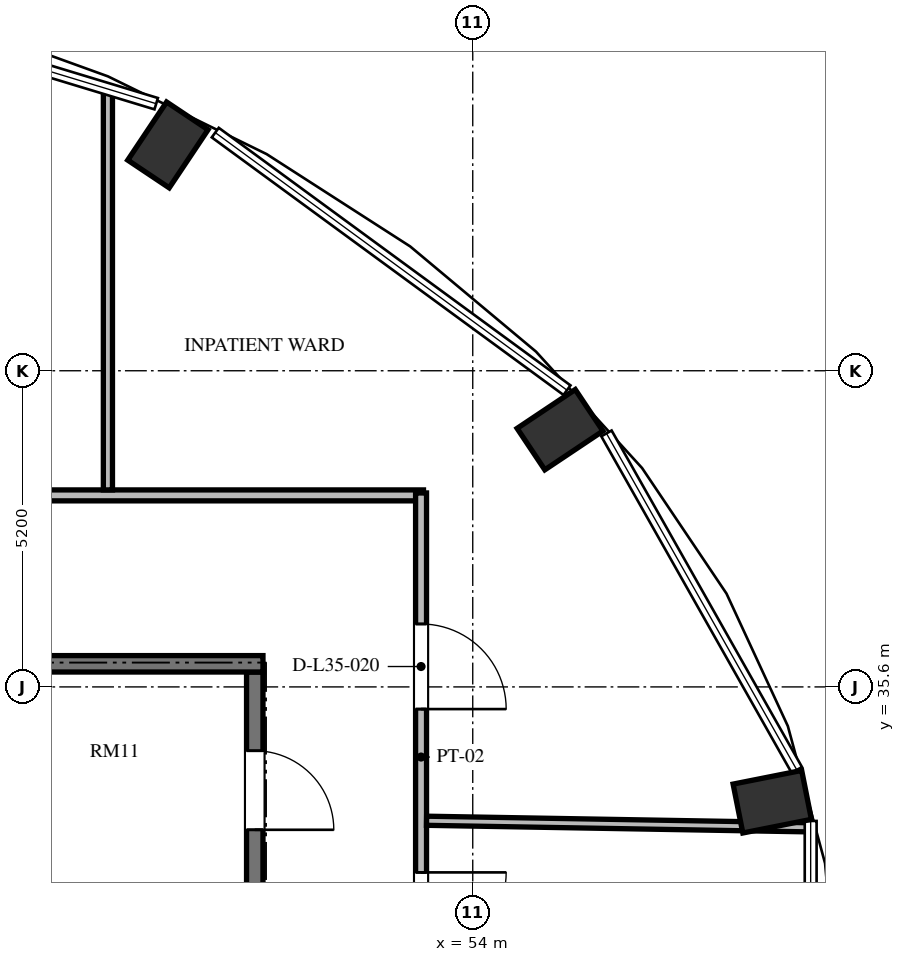
"""IFC4 building model, lengths in metres.
Left out: names, types, materials, properties, quantities, classifications, styles, units other than length and angle.
Written with IfcOpenShell. Run it as: python <this file> out.ifc"""

import sys

from ifc_helpers import new_model, si_unit, direction, frame, frame_2d, origin, origin_2d, place, context, subcontext, project, spatial, rectangle, extrude, element, fill, save


model = new_model("IFC4")
c1 = context("Model", 3, precision=1e-05, world=origin(), true_north=direction((0.0, 1.0)))
c2 = subcontext(c1, "Body", "Model", "MODEL_VIEW")
j1 = project(units=[si_unit("LENGTHUNIT", "METRE"), si_unit("PLANEANGLEUNIT", "RADIAN")], contexts=[c1])
p1 = place(None, origin())
s1 = spatial("IfcSite", under=j1, at=p1, CompositionType="ELEMENT")
p2 = place(p1, origin())
s2 = spatial("IfcBuilding", under=s1, at=p2, CompositionType="ELEMENT")
p3 = place(p2, frame((0.0, 0.0, 138.288)))
s3 = spatial("IfcBuildingStorey", under=s2, at=p3, CompositionType="ELEMENT", Elevation=138.288)
for number, where, z_axis, x_axis in (
    (1, (58.926, 33.712, 0.0), (0.0, 0.0, 1.0), (0.981, 0.195, 0.0)),
    (2, (55.436, 39.831, 0.0), (0.0, 0.0, 1.0), (0.831, 0.556, 0.0)),
    (3, (48.987, 44.514, 0.0), (0.0, 0.0, 1.0), (0.556, 0.831, 0.0)),
):
    element("IfcColumn", number, at=place(p3, frame(where, z_axis=z_axis, x_axis=x_axis)), inside=s3, PredefinedType="COLUMN", context=c2, shape_type="SweptSolid", body=[
        extrude(rectangle(XDim=1.15, YDim=0.82, at=origin_2d()), origin(), (0.0, 0.0, 1.0), 3.648),
    ])
p4 = place(p3, frame((50.415, 35.845, 0.0), z_axis=(0.0, 0.0, 1.0), x_axis=(0.0, -1.0, 0.0)))
e4 = element("IfcWall", 4, at=p4, inside=s3, PredefinedType="SHEAR", context=c2, shape_type="SweptSolid", body=[
    extrude(rectangle(XDim=15.825, YDim=0.27, at=frame_2d((7.913, 0.0))), origin(), (0.0, 0.0, 1.0), 3.648),
])
p5 = place(p4, frame((4.445, 0.0, 0.0)))
e5 = element("IfcOpeningElement", 5, at=p5, cuts=e4, PredefinedType="OPENING", context=c2, shape_type="SweptSolid", body=[
    extrude(rectangle(XDim=1.2, YDim=2.15, at=frame_2d((0.6, 1.075))), frame((0.0, 0.145, 0.0), z_axis=(0.0, -1.0, 0.0), x_axis=(1.0, 0.0, 0.0)), (0.0, 0.0, 1.0), 0.29),
])
p6 = place(p4, frame((1.295, 0.0, 0.0)))
e6 = element("IfcOpeningElement", 6, at=p6, cuts=e4, PredefinedType="OPENING", context=c2, shape_type="SweptSolid", body=[
    extrude(rectangle(XDim=1.3, YDim=2.2, at=frame_2d((0.65, 1.1))), frame((0.0, 0.145, 0.0), z_axis=(0.0, -1.0, 0.0), x_axis=(1.0, 0.0, 0.0)), (0.0, 0.0, 1.0), 0.29),
])
p7 = place(p4, frame((13.095, 0.0, 0.0)))
e7 = element("IfcOpeningElement", 7, at=p7, cuts=e4, PredefinedType="OPENING", context=c2, shape_type="SweptSolid", body=[
    extrude(rectangle(XDim=1.3, YDim=2.2, at=frame_2d((0.65, 1.1))), frame((0.0, 0.145, 0.0), z_axis=(0.0, -1.0, 0.0), x_axis=(1.0, 0.0, 0.0)), (0.0, 0.0, 1.0), 0.29),
])
p8 = place(p3, frame((46.0, 35.98, 0.0), z_axis=(0.0, 0.0, 1.0), x_axis=(1.0, 0.0, 0.0)))
e8 = element("IfcWall", 8, at=p8, inside=s3, PredefinedType="SHEAR", context=c2, shape_type="SweptSolid", body=[
    extrude(rectangle(XDim=4.55, YDim=0.27, at=frame_2d((2.275, 0.0))), origin(), (0.0, 0.0, 1.0), 3.648),
])
p9 = place(p3, frame((39.46, 38.75, 0.0), z_axis=(0.0, 0.0, 1.0), x_axis=(1.0, 0.0, 0.0)))
e9 = element("IfcWall", 9, at=p9, inside=s3, PredefinedType="PARTITIONING", context=c2, shape_type="SweptSolid", body=[
    extrude(rectangle(XDim=13.73, YDim=0.18, at=frame_2d((6.865, 0.0))), origin(), (0.0, 0.0, 1.0), 3.428),
])
p10 = place(p9, frame((5.59, 0.0, 0.0)))
e10 = element("IfcOpeningElement", 10, at=p10, cuts=e9, PredefinedType="OPENING", context=c2, shape_type="SweptSolid", body=[
    extrude(rectangle(XDim=1.4, YDim=2.2, at=frame_2d((0.7, 1.1))), frame((0.0, 0.1, 0.0), z_axis=(0.0, -1.0, 0.0), x_axis=(1.0, 0.0, 0.0)), (0.0, 0.0, 1.0), 0.2),
])
p11 = place(p3, frame((53.15, 38.79, 0.0), z_axis=(0.0, 0.0, 1.0), x_axis=(0.0, -1.0, 0.0)))
e11 = element("IfcWall", 11, at=p11, inside=s3, PredefinedType="PARTITIONING", context=c2, shape_type="SweptSolid", body=[
    extrude(rectangle(XDim=17.374, YDim=0.18, at=frame_2d((8.687, 0.0))), origin(), (0.0, 0.0, 1.0), 3.428),
])
p12 = place(p11, frame((12.613, 0.0, 0.0)))
e12 = element("IfcOpeningElement", 12, at=p12, cuts=e11, PredefinedType="OPENING", context=c2, shape_type="SweptSolid", body=[
    extrude(rectangle(XDim=1.05, YDim=2.15, at=frame_2d((0.525, 1.075))), frame((0.0, 0.1, 0.0), z_axis=(0.0, -1.0, 0.0), x_axis=(1.0, 0.0, 0.0)), (0.0, 0.0, 1.0), 0.2),
])
p13 = place(p11, frame((9.338, 0.0, 0.0)))
e13 = element("IfcOpeningElement", 13, at=p13, cuts=e11, PredefinedType="OPENING", context=c2, shape_type="SweptSolid", body=[
    extrude(rectangle(XDim=1.4, YDim=2.2, at=frame_2d((0.7, 1.1))), frame((0.0, 0.1, 0.0), z_axis=(0.0, -1.0, 0.0), x_axis=(1.0, 0.0, 0.0)), (0.0, 0.0, 1.0), 0.2),
])
p14 = place(p11, frame((6.241, 0.0, 0.0)))
e14 = element("IfcOpeningElement", 14, at=p14, cuts=e11, PredefinedType="OPENING", context=c2, shape_type="SweptSolid", body=[
    extrude(rectangle(XDim=1.4, YDim=2.2, at=frame_2d((0.7, 1.1))), frame((0.0, 0.1, 0.0), z_axis=(0.0, -1.0, 0.0), x_axis=(1.0, 0.0, 0.0)), (0.0, 0.0, 1.0), 0.2),
])
p15 = place(p11, frame((2.155, 0.0, 0.0)))
e15 = element("IfcOpeningElement", 15, at=p15, cuts=e11, PredefinedType="OPENING", context=c2, shape_type="SweptSolid", body=[
    extrude(rectangle(XDim=1.4, YDim=2.2, at=frame_2d((0.7, 1.1))), frame((0.0, 0.1, 0.0), z_axis=(0.0, -1.0, 0.0), x_axis=(1.0, 0.0, 0.0)), (0.0, 0.0, 1.0), 0.2),
])
p16 = place(p3, frame((53.24, 33.399, 0.0), z_axis=(0.0, 0.0, 1.0), x_axis=(0.999852374284, -0.017182247791, 0.0)))
e16 = element("IfcWall", 16, at=p16, inside=s3, PredefinedType="PARTITIONING", context=c2, shape_type="SweptSolid", body=[
    extrude(rectangle(XDim=6.323, YDim=0.15, at=frame_2d((3.162, 0.0))), origin(), (0.0, 0.0, 1.0), 3.428),
])
p17 = place(p3, frame((48.0, 38.84, 0.0), z_axis=(0.0, 0.0, 1.0), x_axis=(0.0, 1.0, 0.0)))
e17 = element("IfcWall", 17, at=p17, inside=s3, PredefinedType="PARTITIONING", context=c2, shape_type="SweptSolid", body=[
    extrude(rectangle(XDim=6.578, YDim=0.15, at=frame_2d((3.289, 0.0))), origin(), (0.0, 0.0, 1.0), 3.428),
])
p18 = place(p6, origin())
e18 = element("IfcDoor", 18, at=p18, inside=s3, OperationType="SINGLE_SWING_RIGHT", PredefinedType="DOOR", context=c2, shape_type="SweptSolid", body=[
    extrude(rectangle(XDim=1.3, YDim=2.2, at=frame_2d((0.65, 1.1))), frame((0.0, 0.025, 0.0), z_axis=(0.0, -1.0, 0.0), x_axis=(1.0, 0.0, 0.0)), (0.0, 0.0, 1.0), 0.05),
])
fill(e6, e18)
p19 = place(p14, origin())
e19 = element("IfcDoor", 19, at=p19, inside=s3, OperationType="SINGLE_SWING_LEFT", PredefinedType="DOOR", context=c2, shape_type="SweptSolid", body=[
    extrude(rectangle(XDim=1.4, YDim=2.2, at=frame_2d((0.7, 1.1))), frame((0.0, 0.025, 0.0), z_axis=(0.0, -1.0, 0.0), x_axis=(1.0, 0.0, 0.0)), (0.0, 0.0, 1.0), 0.05),
])
fill(e14, e19)
p20 = place(p15, origin())
e20 = element("IfcDoor", 20, at=p20, inside=s3, OperationType="SINGLE_SWING_RIGHT", PredefinedType="DOOR", context=c2, shape_type="SweptSolid", body=[
    extrude(rectangle(XDim=1.4, YDim=2.2, at=frame_2d((0.7, 1.1))), frame((0.0, 0.025, 0.0), z_axis=(0.0, -1.0, 0.0), x_axis=(1.0, 0.0, 0.0)), (0.0, 0.0, 1.0), 0.05),
])
fill(e15, e20)
save(model, sys.argv[1])
